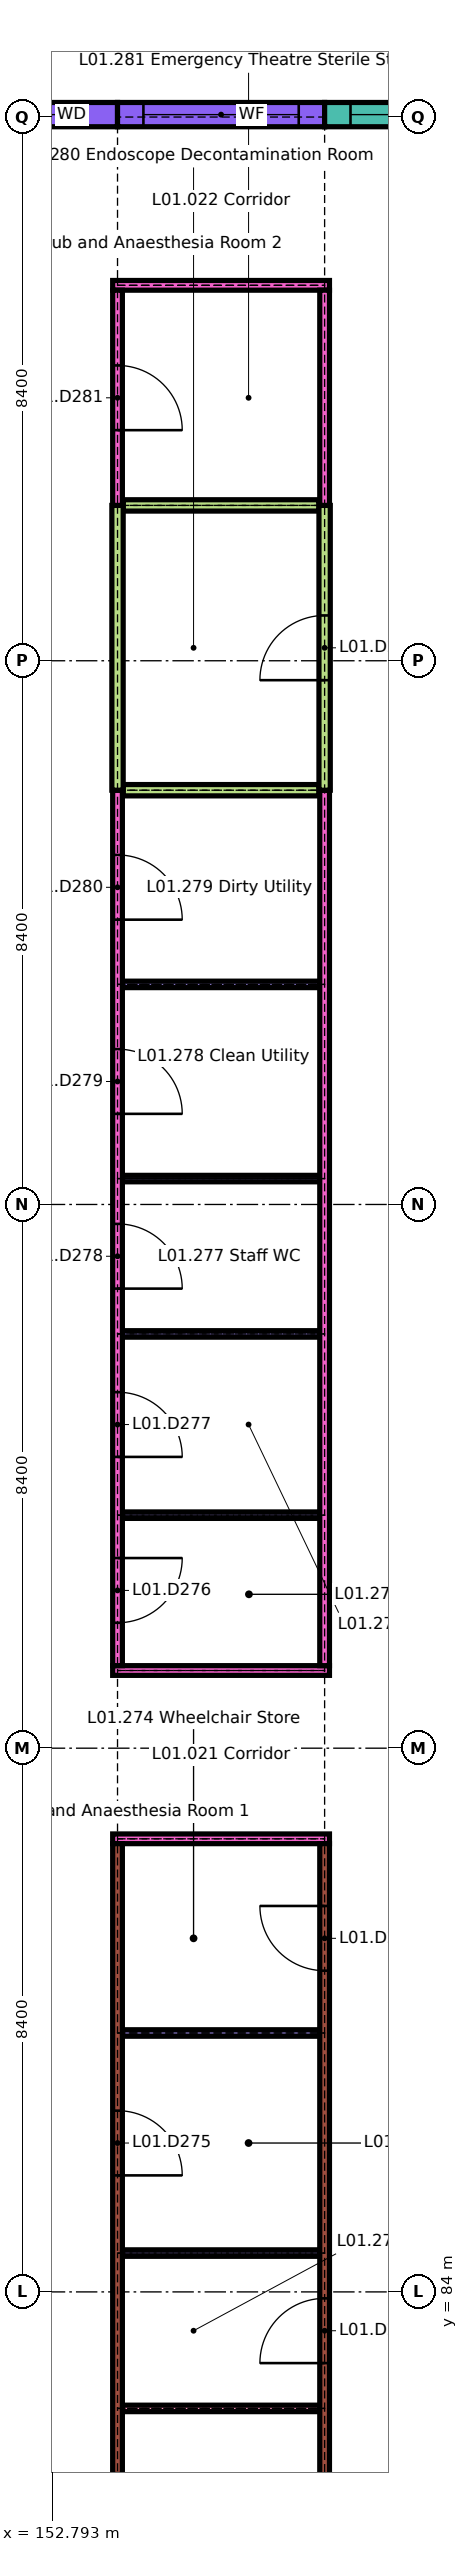
"""IFC4 building model, lengths in metres.
Left out: names, types, materials, properties, quantities, classifications, styles, units other than length and angle.
Written with IfcOpenShell. Run it as: python <this file> out.ifc"""

import sys

from ifc_helpers import new_model, si_unit, direction, frame, frame_2d, origin, place, context, subcontext, project, spatial, rectangle, extrude, element, fill, save


model = new_model("IFC4")
c1 = context("Model", 3, precision=1e-05, world=origin(), true_north=direction((0.0, 1.0)))
c2 = subcontext(c1, "Body", "Model", "MODEL_VIEW")
j1 = project(units=[si_unit("LENGTHUNIT", "METRE"), si_unit("PLANEANGLEUNIT", "RADIAN")], contexts=[c1])
p1 = place(None, origin())
s1 = spatial("IfcSite", under=j1, at=p1, CompositionType="ELEMENT")
p2 = place(p1, origin())
s2 = spatial("IfcBuilding", under=s1, at=p2, CompositionType="ELEMENT")
p3 = place(p2, frame((0.0, 0.0, 4.5)))
s3 = spatial("IfcBuildingStorey", under=s2, at=p3, CompositionType="ELEMENT", Elevation=4.5)
p4 = place(p3, frame((151.625, 117.637, 0.0), z_axis=(0.0, 0.0, 1.0), x_axis=(1.0, 0.0, 0.0)))
e1 = element("IfcWall", 1, at=p4, inside=s3, PredefinedType="SOLIDWALL", context=c2, shape_type="SweptSolid", body=[
    extrude(rectangle(XDim=2.175, YDim=0.375, at=frame_2d((1.087, 0.0))), origin(), (0.0, 0.0, 1.0), 3.6),
])
p5 = place(p4, frame((0.375, 0.0, 0.9)))
e2 = element("IfcOpeningElement", 2, at=p5, cuts=e1, PredefinedType="OPENING", context=c2, shape_type="SweptSolid", body=[
    extrude(rectangle(XDim=1.2, YDim=1.5, at=frame_2d((0.6, 0.75))), frame((0.0, 0.198, 0.0), z_axis=(0.0, -1.0, 0.0), x_axis=(1.0, 0.0, 0.0)), (0.0, 0.0, 1.0), 0.395),
])
p6 = place(p3, frame((153.8, 117.637, 0.0), z_axis=(0.0, 0.0, 1.0), x_axis=(1.0, 0.0, 0.0)))
e3 = element("IfcWall", 3, at=p6, inside=s3, PredefinedType="SOLIDWALL", context=c2, shape_type="SweptSolid", body=[
    extrude(rectangle(XDim=3.2, YDim=0.375, at=frame_2d((1.6, 0.0))), origin(), (0.0, 0.0, 1.0), 3.6),
])
p7 = place(p6, frame((0.4, 0.0, 0.9)))
e4 = element("IfcOpeningElement", 4, at=p7, cuts=e3, PredefinedType="OPENING", context=c2, shape_type="SweptSolid", body=[
    extrude(rectangle(XDim=2.4, YDim=1.5, at=frame_2d((1.2, 0.75))), frame((0.0, 0.198, 0.0), z_axis=(0.0, -1.0, 0.0), x_axis=(1.0, 0.0, 0.0)), (0.0, 0.0, 1.0), 0.395),
])
p8 = place(p3, frame((157.0, 117.637, 0.0), z_axis=(0.0, 0.0, 1.0), x_axis=(1.0, 0.0, 0.0)))
e5 = element("IfcWall", 5, at=p8, inside=s3, PredefinedType="SOLIDWALL", context=c2, shape_type="SweptSolid", body=[
    extrude(rectangle(XDim=2.6, YDim=0.375, at=frame_2d((1.3, 0.0))), origin(), (0.0, 0.0, 1.0), 3.45),
])
p9 = place(p8, frame((0.4, 0.0, 0.9)))
e6 = element("IfcOpeningElement", 6, at=p9, cuts=e5, PredefinedType="OPENING", context=c2, shape_type="SweptSolid", body=[
    extrude(rectangle(XDim=1.8, YDim=1.5, at=frame_2d((0.9, 0.75))), frame((0.0, 0.198, 0.0), z_axis=(0.0, -1.0, 0.0), x_axis=(1.0, 0.0, 0.0)), (0.0, 0.0, 1.0), 0.395),
])
p10 = place(p3, frame((153.875, 82.2, 0.0), z_axis=(0.0, 0.0, 1.0), x_axis=(1.0, 0.0, 0.0)))
e7 = element("IfcWall", 7, at=p10, inside=s3, PredefinedType="PARTITIONING", context=c2, shape_type="SweptSolid", body=[
    extrude(rectangle(XDim=3.05, YDim=0.1, at=frame_2d((1.525, 0.0))), origin(), (0.0, 0.0, 1.0), 3.45),
])
for number, where, z_axis, x_axis in (
    (8, (153.875, 84.6, 0.0), (0.0, 0.0, 1.0), (1.0, 0.0, 0.0)),
    (9, (153.875, 88.0, 0.0), (0.0, 0.0, 1.0), (1.0, 0.0, 0.0)),
):
    element("IfcWall", number, at=place(p3, frame(where, z_axis=z_axis, x_axis=x_axis)), inside=s3, PredefinedType="PARTITIONING", context=c2, shape_type="SweptSolid", body=[
        extrude(rectangle(XDim=3.05, YDim=0.1, at=frame_2d((1.525, 0.0))), origin(), (0.0, 0.0, 1.0), 3.6),
    ])
for number, where, z_axis, x_axis in (
    (10, (153.725, 91.0, 0.0), (0.0, 0.0, 1.0), (1.0, 0.0, 0.0)),
    (11, (153.725, 93.6, 0.0), (0.0, 0.0, 1.0), (1.0, 0.0, 0.0)),
):
    element("IfcWall", number, at=place(p3, frame(where, z_axis=z_axis, x_axis=x_axis)), inside=s3, PredefinedType="PARTITIONING", context=c2, shape_type="SweptSolid", body=[
        extrude(rectangle(XDim=3.35, YDim=0.15, at=frame_2d((1.675, 0.0))), origin(), (0.0, 0.0, 1.0), 3.6),
    ])
for number, where, z_axis, x_axis in (
    (12, (153.875, 96.0, 0.0), (0.0, 0.0, 1.0), (1.0, 0.0, 0.0)),
    (13, (153.875, 98.8, 0.0), (0.0, 0.0, 1.0), (1.0, 0.0, 0.0)),
    (14, (153.875, 101.2, 0.0), (0.0, 0.0, 1.0), (1.0, 0.0, 0.0)),
    (15, (153.875, 104.2, 0.0), (0.0, 0.0, 1.0), (1.0, 0.0, 0.0)),
):
    element("IfcWall", number, at=place(p3, frame(where, z_axis=z_axis, x_axis=x_axis)), inside=s3, PredefinedType="PARTITIONING", context=c2, shape_type="SweptSolid", body=[
        extrude(rectangle(XDim=3.05, YDim=0.1, at=frame_2d((1.525, 0.0))), origin(), (0.0, 0.0, 1.0), 3.6),
    ])
for number, where, z_axis, x_axis in (
    (16, (153.887, 107.2, 0.0), (0.0, 0.0, 1.0), (1.0, 0.0, 0.0)),
    (17, (153.887, 111.6, 0.0), (0.0, 0.0, 1.0), (1.0, 0.0, 0.0)),
):
    element("IfcWall", number, at=place(p3, frame(where, z_axis=z_axis, x_axis=x_axis)), inside=s3, PredefinedType="PARTITIONING", context=c2, shape_type="SweptSolid", body=[
        extrude(rectangle(XDim=3.025, YDim=0.175, at=frame_2d((1.513, 0.0))), origin(), (0.0, 0.0, 1.0), 3.6),
    ])
p11 = place(p3, frame((153.725, 115.0, 0.0), z_axis=(0.0, 0.0, 1.0), x_axis=(1.0, 0.0, 0.0)))
e18 = element("IfcWall", 18, at=p11, inside=s3, PredefinedType="PARTITIONING", context=c2, shape_type="SweptSolid", body=[
    extrude(rectangle(XDim=3.35, YDim=0.15, at=frame_2d((1.675, 0.0))), origin(), (0.0, 0.0, 1.0), 3.6),
])
p12 = place(p3, frame((153.8, 65.675, 0.0), z_axis=(0.0, 0.0, 1.0), x_axis=(0.0, 1.0, 0.0)))
e19 = element("IfcWall", 19, at=p12, inside=s3, PredefinedType="PARTITIONING", context=c2, shape_type="SweptSolid", body=[
    extrude(rectangle(XDim=25.25, YDim=0.15, at=frame_2d((12.625, 0.0))), origin(), (0.0, 0.0, 1.0), 3.45),
])
p13 = place(p12, frame((3.225, 0.0, 0.0)))
e20 = element("IfcOpeningElement", 20, at=p13, cuts=e19, PredefinedType="OPENING", context=c2, shape_type="SweptSolid", body=[
    extrude(rectangle(XDim=1.0, YDim=2.1, at=frame_2d((0.5, 1.05))), frame((0.0, 0.085, 0.0), z_axis=(0.0, -1.0, 0.0), x_axis=(1.0, 0.0, 0.0)), (0.0, 0.0, 1.0), 0.17),
])
p14 = place(p12, frame((8.525, 0.0, 0.0)))
e21 = element("IfcOpeningElement", 21, at=p14, cuts=e19, PredefinedType="OPENING", context=c2, shape_type="SweptSolid", body=[
    extrude(rectangle(XDim=1.0, YDim=2.1, at=frame_2d((0.5, 1.05))), frame((0.0, 0.085, 0.0), z_axis=(0.0, -1.0, 0.0), x_axis=(1.0, 0.0, 0.0)), (0.0, 0.0, 1.0), 0.17),
])
p15 = place(p12, frame((14.525, 0.0, 0.0)))
e22 = element("IfcOpeningElement", 22, at=p15, cuts=e19, PredefinedType="OPENING", context=c2, shape_type="SweptSolid", body=[
    extrude(rectangle(XDim=1.0, YDim=2.1, at=frame_2d((0.5, 1.05))), frame((0.0, 0.085, 0.0), z_axis=(0.0, -1.0, 0.0), x_axis=(1.0, 0.0, 0.0)), (0.0, 0.0, 1.0), 0.17),
])
p16 = place(p12, frame((20.125, 0.0, 0.0)))
e23 = element("IfcOpeningElement", 23, at=p16, cuts=e19, PredefinedType="OPENING", context=c2, shape_type="SweptSolid", body=[
    extrude(rectangle(XDim=1.0, YDim=2.1, at=frame_2d((0.5, 1.05))), frame((0.0, 0.085, 0.0), z_axis=(0.0, -1.0, 0.0), x_axis=(1.0, 0.0, 0.0)), (0.0, 0.0, 1.0), 0.17),
])
p17 = place(p3, frame((153.8, 93.675, 0.0), z_axis=(0.0, 0.0, 1.0), x_axis=(0.0, 1.0, 0.0)))
e24 = element("IfcWall", 24, at=p17, inside=s3, PredefinedType="PARTITIONING", context=c2, shape_type="SweptSolid", body=[
    extrude(rectangle(XDim=13.525, YDim=0.15, at=frame_2d((6.762, 0.0))), origin(), (0.0, 0.0, 1.0), 3.6),
])
p18 = place(p17, frame((0.663, 0.0, 0.0)))
e25 = element("IfcOpeningElement", 25, at=p18, cuts=e24, PredefinedType="OPENING", context=c2, shape_type="SweptSolid", body=[
    extrude(rectangle(XDim=1.0, YDim=2.1, at=frame_2d((0.5, 1.05))), frame((0.0, 0.085, 0.0), z_axis=(0.0, -1.0, 0.0), x_axis=(1.0, 0.0, 0.0)), (0.0, 0.0, 1.0), 0.17),
])
p19 = place(p17, frame((3.225, 0.0, 0.0)))
e26 = element("IfcOpeningElement", 26, at=p19, cuts=e24, PredefinedType="OPENING", context=c2, shape_type="SweptSolid", body=[
    extrude(rectangle(XDim=1.0, YDim=2.1, at=frame_2d((0.5, 1.05))), frame((0.0, 0.085, 0.0), z_axis=(0.0, -1.0, 0.0), x_axis=(1.0, 0.0, 0.0)), (0.0, 0.0, 1.0), 0.17),
])
p20 = place(p17, frame((5.825, 0.0, 0.0)))
e27 = element("IfcOpeningElement", 27, at=p20, cuts=e24, PredefinedType="OPENING", context=c2, shape_type="SweptSolid", body=[
    extrude(rectangle(XDim=1.0, YDim=2.1, at=frame_2d((0.5, 1.05))), frame((0.0, 0.085, 0.0), z_axis=(0.0, -1.0, 0.0), x_axis=(1.0, 0.0, 0.0)), (0.0, 0.0, 1.0), 0.17),
])
p21 = place(p17, frame((8.525, 0.0, 0.0)))
e28 = element("IfcOpeningElement", 28, at=p21, cuts=e24, PredefinedType="OPENING", context=c2, shape_type="SweptSolid", body=[
    extrude(rectangle(XDim=1.0, YDim=2.1, at=frame_2d((0.5, 1.05))), frame((0.0, 0.085, 0.0), z_axis=(0.0, -1.0, 0.0), x_axis=(1.0, 0.0, 0.0)), (0.0, 0.0, 1.0), 0.17),
])
p22 = place(p17, frame((11.525, 0.0, 0.0)))
e29 = element("IfcOpeningElement", 29, at=p22, cuts=e24, PredefinedType="OPENING", context=c2, shape_type="SweptSolid", body=[
    extrude(rectangle(XDim=1.0, YDim=2.1, at=frame_2d((0.5, 1.05))), frame((0.0, 0.085, 0.0), z_axis=(0.0, -1.0, 0.0), x_axis=(1.0, 0.0, 0.0)), (0.0, 0.0, 1.0), 0.17),
])
p23 = place(p3, frame((153.8, 107.2, 0.0), z_axis=(0.0, 0.0, 1.0), x_axis=(0.0, 1.0, 0.0)))
e30 = element("IfcWall", 30, at=p23, inside=s3, PredefinedType="PARTITIONING", context=c2, shape_type="SweptSolid", body=[
    extrude(rectangle(XDim=4.4, YDim=0.175, at=frame_2d((2.2, 0.0))), origin(), (0.0, 0.0, 1.0), 3.6),
])
p24 = place(p3, frame((153.8, 111.6, 0.0), z_axis=(0.0, 0.0, 1.0), x_axis=(0.0, 1.0, 0.0)))
e31 = element("IfcWall", 31, at=p24, inside=s3, PredefinedType="PARTITIONING", context=c2, shape_type="SweptSolid", body=[
    extrude(rectangle(XDim=3.325, YDim=0.15, at=frame_2d((1.663, 0.0))), origin(), (0.0, 0.0, 1.0), 3.6),
])
p25 = place(p24, frame((1.163, 0.0, 0.0)))
e32 = element("IfcOpeningElement", 32, at=p25, cuts=e31, PredefinedType="OPENING", context=c2, shape_type="SweptSolid", body=[
    extrude(rectangle(XDim=1.0, YDim=2.1, at=frame_2d((0.5, 1.05))), frame((0.0, 0.085, 0.0), z_axis=(0.0, -1.0, 0.0), x_axis=(1.0, 0.0, 0.0)), (0.0, 0.0, 1.0), 0.17),
])
p26 = place(p3, frame((157.0, 65.675, 0.0), z_axis=(0.0, 0.0, 1.0), x_axis=(0.0, 1.0, 0.0)))
e33 = element("IfcWall", 33, at=p26, inside=s3, PredefinedType="PARTITIONING", context=c2, shape_type="SweptSolid", body=[
    extrude(rectangle(XDim=25.25, YDim=0.15, at=frame_2d((12.625, 0.0))), origin(), (0.0, 0.0, 1.0), 3.45),
])
p27 = place(p26, frame((0.663, 0.0, 0.0)))
e34 = element("IfcOpeningElement", 34, at=p27, cuts=e33, PredefinedType="OPENING", context=c2, shape_type="SweptSolid", body=[
    extrude(rectangle(XDim=1.0, YDim=2.1, at=frame_2d((0.5, 1.05))), frame((0.0, 0.085, 0.0), z_axis=(0.0, -1.0, 0.0), x_axis=(1.0, 0.0, 0.0)), (0.0, 0.0, 1.0), 0.17),
])
p28 = place(p26, frame((5.825, 0.0, 0.0)))
e35 = element("IfcOpeningElement", 35, at=p28, cuts=e33, PredefinedType="OPENING", context=c2, shape_type="SweptSolid", body=[
    extrude(rectangle(XDim=1.0, YDim=2.1, at=frame_2d((0.5, 1.05))), frame((0.0, 0.085, 0.0), z_axis=(0.0, -1.0, 0.0), x_axis=(1.0, 0.0, 0.0)), (0.0, 0.0, 1.0), 0.17),
])
p29 = place(p26, frame((11.525, 0.0, 0.0)))
e36 = element("IfcOpeningElement", 36, at=p29, cuts=e33, PredefinedType="OPENING", context=c2, shape_type="SweptSolid", body=[
    extrude(rectangle(XDim=1.0, YDim=2.1, at=frame_2d((0.5, 1.05))), frame((0.0, 0.085, 0.0), z_axis=(0.0, -1.0, 0.0), x_axis=(1.0, 0.0, 0.0)), (0.0, 0.0, 1.0), 0.17),
])
p30 = place(p26, frame((17.225, 0.0, 0.0)))
e37 = element("IfcOpeningElement", 37, at=p30, cuts=e33, PredefinedType="OPENING", context=c2, shape_type="SweptSolid", body=[
    extrude(rectangle(XDim=1.0, YDim=2.1, at=frame_2d((0.5, 1.05))), frame((0.0, 0.085, 0.0), z_axis=(0.0, -1.0, 0.0), x_axis=(1.0, 0.0, 0.0)), (0.0, 0.0, 1.0), 0.17),
])
p31 = place(p26, frame((23.288, 0.0, 0.0)))
e38 = element("IfcOpeningElement", 38, at=p31, cuts=e33, PredefinedType="OPENING", context=c2, shape_type="SweptSolid", body=[
    extrude(rectangle(XDim=1.0, YDim=2.1, at=frame_2d((0.5, 1.05))), frame((0.0, 0.085, 0.0), z_axis=(0.0, -1.0, 0.0), x_axis=(1.0, 0.0, 0.0)), (0.0, 0.0, 1.0), 0.17),
])
p32 = place(p3, frame((157.0, 93.675, 0.0), z_axis=(0.0, 0.0, 1.0), x_axis=(0.0, 1.0, 0.0)))
e39 = element("IfcWall", 39, at=p32, inside=s3, PredefinedType="PARTITIONING", context=c2, shape_type="SweptSolid", body=[
    extrude(rectangle(XDim=13.525, YDim=0.15, at=frame_2d((6.762, 0.0))), origin(), (0.0, 0.0, 1.0), 3.6),
])
p33 = place(p3, frame((157.0, 107.2, 0.0), z_axis=(0.0, 0.0, 1.0), x_axis=(0.0, 1.0, 0.0)))
e40 = element("IfcWall", 40, at=p33, inside=s3, PredefinedType="PARTITIONING", context=c2, shape_type="SweptSolid", body=[
    extrude(rectangle(XDim=4.4, YDim=0.175, at=frame_2d((2.2, 0.0))), origin(), (0.0, 0.0, 1.0), 3.6),
])
p34 = place(p33, frame((1.7, 0.0, 0.0)))
e41 = element("IfcOpeningElement", 41, at=p34, cuts=e40, PredefinedType="OPENING", context=c2, shape_type="SweptSolid", body=[
    extrude(rectangle(XDim=1.0, YDim=2.1, at=frame_2d((0.5, 1.05))), frame((0.0, 0.097, 0.0), z_axis=(0.0, -1.0, 0.0), x_axis=(1.0, 0.0, 0.0)), (0.0, 0.0, 1.0), 0.195),
])
p35 = place(p3, frame((157.0, 111.6, 0.0), z_axis=(0.0, 0.0, 1.0), x_axis=(0.0, 1.0, 0.0)))
e42 = element("IfcWall", 42, at=p35, inside=s3, PredefinedType="PARTITIONING", context=c2, shape_type="SweptSolid", body=[
    extrude(rectangle(XDim=3.325, YDim=0.15, at=frame_2d((1.663, 0.0))), origin(), (0.0, 0.0, 1.0), 3.6),
])
p36 = place(p5, origin())
e43 = element("IfcWindow", 43, at=p36, inside=s3, PartitioningType="SINGLE_PANEL", PredefinedType="WINDOW", context=c2, shape_type="SweptSolid", body=[
    extrude(rectangle(XDim=1.2, YDim=1.5, at=frame_2d((0.6, 0.75))), frame((0.0, 0.03, 0.0), z_axis=(0.0, -1.0, 0.0), x_axis=(1.0, 0.0, 0.0)), (0.0, 0.0, 1.0), 0.06),
])
fill(e2, e43)
p37 = place(p7, origin())
e44 = element("IfcWindow", 44, at=p37, inside=s3, PartitioningType="DOUBLE_PANEL_VERTICAL", PredefinedType="WINDOW", context=c2, shape_type="SweptSolid", body=[
    extrude(rectangle(XDim=2.4, YDim=1.5, at=frame_2d((1.2, 0.75))), frame((0.0, 0.03, 0.0), z_axis=(0.0, -1.0, 0.0), x_axis=(1.0, 0.0, 0.0)), (0.0, 0.0, 1.0), 0.06),
])
fill(e4, e44)
p38 = place(p9, origin())
e45 = element("IfcWindow", 45, at=p38, inside=s3, PartitioningType="DOUBLE_PANEL_VERTICAL", PredefinedType="WINDOW", context=c2, shape_type="SweptSolid", body=[
    extrude(rectangle(XDim=1.8, YDim=1.5, at=frame_2d((0.9, 0.75))), frame((0.0, 0.03, 0.0), z_axis=(0.0, -1.0, 0.0), x_axis=(1.0, 0.0, 0.0)), (0.0, 0.0, 1.0), 0.06),
])
fill(e6, e45)
p39 = place(p16, origin())
e46 = element("IfcDoor", 46, at=p39, inside=s3, OperationType="SINGLE_SWING_LEFT", PredefinedType="DOOR", context=c2, shape_type="SweptSolid", body=[
    extrude(rectangle(XDim=1.0, YDim=2.1, at=frame_2d((0.5, 1.05))), frame((0.0, 0.025, 0.0), z_axis=(0.0, -1.0, 0.0), x_axis=(1.0, 0.0, 0.0)), (0.0, 0.0, 1.0), 0.05),
])
fill(e23, e46)
p40 = place(p18, origin())
e47 = element("IfcDoor", 47, at=p40, inside=s3, OperationType="SINGLE_SWING_RIGHT", PredefinedType="DOOR", context=c2, shape_type="SweptSolid", body=[
    extrude(rectangle(XDim=1.0, YDim=2.1, at=frame_2d((0.5, 1.05))), frame((0.0, 0.025, 0.0), z_axis=(0.0, -1.0, 0.0), x_axis=(1.0, 0.0, 0.0)), (0.0, 0.0, 1.0), 0.05),
])
fill(e25, e47)
p41 = place(p19, origin())
e48 = element("IfcDoor", 48, at=p41, inside=s3, OperationType="SINGLE_SWING_LEFT", PredefinedType="DOOR", context=c2, shape_type="SweptSolid", body=[
    extrude(rectangle(XDim=1.0, YDim=2.1, at=frame_2d((0.5, 1.05))), frame((0.0, 0.025, 0.0), z_axis=(0.0, -1.0, 0.0), x_axis=(1.0, 0.0, 0.0)), (0.0, 0.0, 1.0), 0.05),
])
fill(e26, e48)
p42 = place(p20, origin())
e49 = element("IfcDoor", 49, at=p42, inside=s3, OperationType="SINGLE_SWING_LEFT", PredefinedType="DOOR", context=c2, shape_type="SweptSolid", body=[
    extrude(rectangle(XDim=1.0, YDim=2.1, at=frame_2d((0.5, 1.05))), frame((0.0, 0.025, 0.0), z_axis=(0.0, -1.0, 0.0), x_axis=(1.0, 0.0, 0.0)), (0.0, 0.0, 1.0), 0.05),
])
fill(e27, e49)
p43 = place(p21, origin())
e50 = element("IfcDoor", 50, at=p43, inside=s3, OperationType="SINGLE_SWING_LEFT", PredefinedType="DOOR", context=c2, shape_type="SweptSolid", body=[
    extrude(rectangle(XDim=1.0, YDim=2.1, at=frame_2d((0.5, 1.05))), frame((0.0, 0.025, 0.0), z_axis=(0.0, -1.0, 0.0), x_axis=(1.0, 0.0, 0.0)), (0.0, 0.0, 1.0), 0.05),
])
fill(e28, e50)
p44 = place(p22, origin())
e51 = element("IfcDoor", 51, at=p44, inside=s3, OperationType="SINGLE_SWING_LEFT", PredefinedType="DOOR", context=c2, shape_type="SweptSolid", body=[
    extrude(rectangle(XDim=1.0, YDim=2.1, at=frame_2d((0.5, 1.05))), frame((0.0, 0.025, 0.0), z_axis=(0.0, -1.0, 0.0), x_axis=(1.0, 0.0, 0.0)), (0.0, 0.0, 1.0), 0.05),
])
fill(e29, e51)
p45 = place(p25, origin())
e52 = element("IfcDoor", 52, at=p45, inside=s3, OperationType="SINGLE_SWING_LEFT", PredefinedType="DOOR", context=c2, shape_type="SweptSolid", body=[
    extrude(rectangle(XDim=1.0, YDim=2.1, at=frame_2d((0.5, 1.05))), frame((0.0, 0.025, 0.0), z_axis=(0.0, -1.0, 0.0), x_axis=(1.0, 0.0, 0.0)), (0.0, 0.0, 1.0), 0.05),
])
fill(e32, e52)
p46 = place(p30, origin())
e53 = element("IfcDoor", 53, at=p46, inside=s3, OperationType="SINGLE_SWING_RIGHT", PredefinedType="DOOR", context=c2, shape_type="SweptSolid", body=[
    extrude(rectangle(XDim=1.0, YDim=2.1, at=frame_2d((0.5, 1.05))), frame((0.0, 0.025, 0.0), z_axis=(0.0, -1.0, 0.0), x_axis=(1.0, 0.0, 0.0)), (0.0, 0.0, 1.0), 0.05),
])
fill(e37, e53)
p47 = place(p31, origin())
e54 = element("IfcDoor", 54, at=p47, inside=s3, OperationType="SINGLE_SWING_LEFT", PredefinedType="DOOR", context=c2, shape_type="SweptSolid", body=[
    extrude(rectangle(XDim=1.0, YDim=2.1, at=frame_2d((0.5, 1.05))), frame((0.0, 0.025, 0.0), z_axis=(0.0, -1.0, 0.0), x_axis=(1.0, 0.0, 0.0)), (0.0, 0.0, 1.0), 0.05),
])
fill(e38, e54)
p48 = place(p34, origin())
e55 = element("IfcDoor", 55, at=p48, inside=s3, OperationType="SINGLE_SWING_RIGHT", PredefinedType="DOOR", context=c2, shape_type="SweptSolid", body=[
    extrude(rectangle(XDim=1.0, YDim=2.1, at=frame_2d((0.5, 1.05))), frame((0.0, 0.035, 0.0), z_axis=(0.0, -1.0, 0.0), x_axis=(1.0, 0.0, 0.0)), (0.0, 0.0, 1.0), 0.07),
])
fill(e41, e55)
save(model, sys.argv[1])
